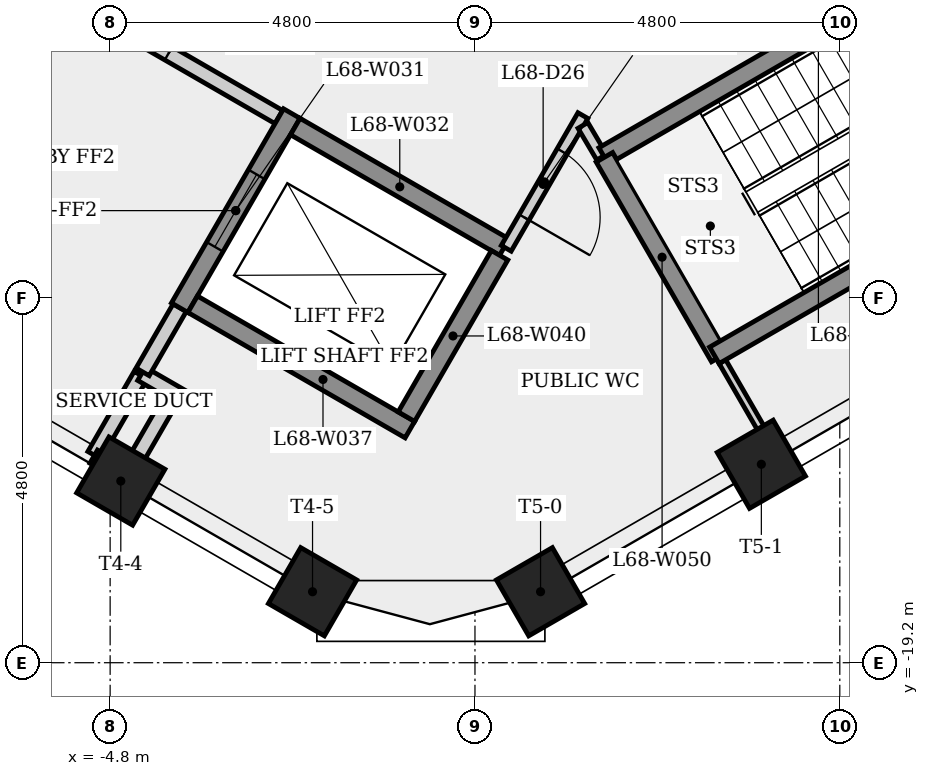
"""IFC4 building model, lengths in metres.
Left out: names, types, materials, properties, quantities, classifications, styles, units other than length and angle.
Written with IfcOpenShell. Run it as: python <this file> out.ifc"""

import sys

from ifc_helpers import new_model, si_unit, direction, frame, frame_2d, origin, origin_2d, place, context, subcontext, project, spatial, rectangle, extrude, element, fill, save


model = new_model("IFC4")
c1 = context("Model", 3, precision=1e-05, world=origin(), true_north=direction((0.0, 1.0)))
c2 = subcontext(c1, "Body", "Model", "MODEL_VIEW")
j1 = project(units=[si_unit("LENGTHUNIT", "METRE"), si_unit("PLANEANGLEUNIT", "RADIAN")], contexts=[c1])
p1 = place(None, origin())
s1 = spatial("IfcSite", under=j1, at=p1, CompositionType="ELEMENT")
p2 = place(p1, origin())
s2 = spatial("IfcBuilding", under=s1, at=p2, CompositionType="ELEMENT")
p3 = place(p2, frame((0.0, 0.0, 252.9)))
s3 = spatial("IfcBuildingStorey", under=s2, at=p3, CompositionType="ELEMENT", Elevation=252.9)
for number, where, z_axis, x_axis in (
    (1, (-4.66, -16.81, 0.0), (0.0, 0.0, 1.0), (-0.5, -0.866, 0.0)),
    (2, (-2.137, -18.266, 0.0), (0.0, 0.0, 1.0), (-0.5, -0.866, 0.0)),
    (3, (0.863, -18.266, 0.0), (0.0, 0.0, 1.0), (0.5, -0.866, 0.0)),
    (4, (3.768, -16.589, 0.0), (0.0, 0.0, 1.0), (0.5, -0.866, 0.0)),
):
    element("IfcColumn", number, at=place(p3, frame(where, z_axis=z_axis, x_axis=x_axis)), inside=s3, PredefinedType="COLUMN", context=c2, shape_type="SweptSolid", body=[
        extrude(rectangle(XDim=0.85, YDim=0.85, at=origin_2d()), origin(), (0.0, 0.0, 1.0), 5.0),
    ])
p4 = place(p3, frame((-6.435, -9.795, 0.0), z_axis=(0.0, 0.0, 1.0), x_axis=(0.866012907634, -0.500021643343, 0.0)))
e5 = element("IfcWall", 5, at=p4, inside=s3, PredefinedType="PARTITIONING", context=c2, shape_type="SweptSolid", body=[
    extrude(rectangle(XDim=4.45, YDim=0.2, at=frame_2d((2.225, 0.0))), origin(), (0.0, 0.0, 1.0), 4.6),
])
p5 = place(p4, frame((1.675, 0.0, 0.0)))
e6 = element("IfcOpeningElement", 6, at=p5, cuts=e5, PredefinedType="OPENING", context=c2, shape_type="SweptSolid", body=[
    extrude(rectangle(XDim=1.1, YDim=2.1, at=frame_2d((0.55, 1.05))), frame((0.0, 0.11, 0.0), z_axis=(0.0, -1.0, 0.0), x_axis=(1.0, 0.0, 0.0)), (0.0, 0.0, 1.0), 0.22),
])
p6 = place(p3, frame((-5.006, -16.471, 0.0), z_axis=(0.0, 0.0, 1.0), x_axis=(0.499913398087, 0.866075397649, 0.0)))
e7 = element("IfcWall", 7, at=p6, inside=s3, PredefinedType="PLUMBINGWALL", context=c2, shape_type="SweptSolid", body=[
    extrude(rectangle(XDim=1.218, YDim=0.2, at=frame_2d((0.609, 0.0))), origin(), (0.0, 0.0, 1.0), 4.6),
])
for number, where, z_axis, x_axis in (
    (8, (-4.497, -16.788, 0.0), (0.0, 0.0, 1.0), (-0.866, 0.5, 0.0)),
    (9, (-4.387, -15.399, 0.0), (0.0, 0.0, 1.0), (0.866, -0.5, 0.0)),
):
    element("IfcWall", number, at=place(p3, frame(where, z_axis=z_axis, x_axis=x_axis)), inside=s3, PredefinedType="PLUMBINGWALL", context=c2, shape_type="SweptSolid", body=[
        extrude(rectangle(XDim=0.6, YDim=0.2, at=frame_2d((0.3, 0.0))), origin(), (0.0, 0.0, 1.0), 4.6),
    ])
p7 = place(p3, frame((-4.004, -15.736, 0.0), z_axis=(0.0, 0.0, 1.0), x_axis=(-0.500062184469, -0.865989498588, 0.0)))
e10 = element("IfcWall", 10, at=p7, inside=s3, PredefinedType="PLUMBINGWALL", context=c2, shape_type="SweptSolid", body=[
    extrude(rectangle(XDim=1.057, YDim=0.2, at=frame_2d((0.529, 0.0))), origin(), (0.0, 0.0, 1.0), 4.6),
])
p8 = place(p3, frame((-3.885, -14.529, 0.0), z_axis=(0.0, 0.0, 1.0), x_axis=(-0.49998975084, -0.866031321059, 0.0)))
e11 = element("IfcWall", 11, at=p8, inside=s3, PredefinedType="PARTITIONING", context=c2, shape_type="SweptSolid", body=[
    extrude(rectangle(XDim=0.975, YDim=0.2, at=frame_2d((0.488, 0.0))), origin(), (0.0, 0.0, 1.0), 4.6),
])
p9 = place(p3, frame((-2.41, -11.974, 0.0), z_axis=(0.0, 0.0, 1.0), x_axis=(-0.500001826776, -0.866024349092, 0.0)))
e12 = element("IfcWall", 12, at=p9, inside=s3, PredefinedType="SHEAR", context=c2, shape_type="SweptSolid", body=[
    extrude(rectangle(XDim=2.95, YDim=0.25, at=frame_2d((1.475, 0.0))), origin(), (0.0, 0.0, 1.0), 4.6),
])
p10 = place(p9, frame((0.925, 0.0, 0.0)))
e13 = element("IfcOpeningElement", 13, at=p10, cuts=e12, PredefinedType="OPENING", context=c2, shape_type="SweptSolid", body=[
    extrude(rectangle(XDim=1.1, YDim=2.1, at=frame_2d((0.55, 1.05))), frame((0.0, 0.135, 0.0), z_axis=(0.0, -1.0, 0.0), x_axis=(1.0, 0.0, 0.0)), (0.0, 0.0, 1.0), 0.27),
])
p11 = place(p3, frame((-2.364, -12.145, 0.0), z_axis=(0.0, 0.0, 1.0), x_axis=(0.866048579423, -0.499959856469, 0.0)))
e14 = element("IfcWall", 14, at=p11, inside=s3, PredefinedType="SHEAR", context=c2, shape_type="SweptSolid", body=[
    extrude(rectangle(XDim=3.175, YDim=0.25, at=frame_2d((1.587, 0.0))), origin(), (0.0, 0.0, 1.0), 5.0),
])
p12 = place(p3, frame((-0.856, -16.133, 0.0), z_axis=(0.0, 0.0, 1.0), x_axis=(-0.866021716278, 0.500006386895, 0.0)))
e15 = element("IfcWall", 15, at=p12, inside=s3, PredefinedType="SHEAR", context=c2, shape_type="SweptSolid", body=[
    extrude(rectangle(XDim=3.3, YDim=0.25, at=frame_2d((1.65, 0.0))), origin(), (0.0, 0.0, 1.0), 4.6),
])
p13 = place(p3, frame((0.324, -13.839, 0.0), z_axis=(0.0, 0.0, 1.0), x_axis=(-0.500015484165, -0.866016463813, 0.0)))
e16 = element("IfcWall", 16, at=p13, inside=s3, PredefinedType="SHEAR", context=c2, shape_type="SweptSolid", body=[
    extrude(rectangle(XDim=2.452, YDim=0.25, at=frame_2d((1.226, 0.0))), origin(), (0.0, 0.0, 1.0), 5.0),
])
p14 = place(p3, frame((1.42, -12.0, 0.0), z_axis=(0.0, 0.0, 1.0), x_axis=(-0.499952933402, -0.866052575992, 0.0)))
e17 = element("IfcWall", 17, at=p14, inside=s3, PredefinedType="PARTITIONING", context=c2, shape_type="SweptSolid", body=[
    extrude(rectangle(XDim=2.017, YDim=0.15, at=frame_2d((1.009, 0.0))), origin(), (0.0, 0.0, 1.0), 4.6),
])
p15 = place(p14, frame((0.546, 0.0, 0.0)))
e18 = element("IfcOpeningElement", 18, at=p15, cuts=e17, PredefinedType="OPENING", context=c2, shape_type="SweptSolid", body=[
    extrude(rectangle(XDim=1.0, YDim=2.1, at=frame_2d((0.5, 1.05))), frame((0.0, 0.085, 0.0), z_axis=(0.0, -1.0, 0.0), x_axis=(1.0, 0.0, 0.0)), (0.0, 0.0, 1.0), 0.17),
])
p16 = place(p3, frame((1.667, -12.548, 0.0), z_axis=(0.0, 0.0, 1.0), x_axis=(-0.508186221736, 0.861247214241, 0.0)))
e19 = element("IfcWall", 19, at=p16, inside=s3, PredefinedType="PARTITIONING", context=c2, shape_type="SweptSolid", body=[
    extrude(rectangle(XDim=0.485, YDim=0.15, at=frame_2d((0.242, 0.0))), origin(), (0.0, 0.0, 1.0), 4.6),
])
p17 = place(p3, frame((1.693, -12.532, 0.0), z_axis=(0.0, 0.0, 1.0), x_axis=(0.866031063448, 0.499990197047, 0.0)))
e20 = element("IfcWall", 20, at=p17, inside=s3, PredefinedType="SHEAR", context=c2, shape_type="SweptSolid", body=[
    extrude(rectangle(XDim=6.525, YDim=0.25, at=frame_2d((3.263, 0.0))), origin(), (0.0, 0.0, 1.0), 4.6),
])
p18 = place(p17, frame((5.15, 0.0, 0.0)))
e21 = element("IfcOpeningElement", 21, at=p18, cuts=e20, PredefinedType="OPENING", context=c2, shape_type="SweptSolid", body=[
    extrude(rectangle(XDim=1.0, YDim=2.1, at=frame_2d((0.5, 1.05))), frame((0.0, 0.135, 0.0), z_axis=(0.0, -1.0, 0.0), x_axis=(1.0, 0.0, 0.0)), (0.0, 0.0, 1.0), 0.27),
])
p19 = place(p3, frame((3.221, -15.178, 0.0), z_axis=(0.0, 0.0, 1.0), x_axis=(-0.500014901547, 0.866016800201, 0.0)))
e22 = element("IfcWall", 22, at=p19, inside=s3, PredefinedType="SHEAR", context=c2, shape_type="SweptSolid", body=[
    extrude(rectangle(XDim=3.035, YDim=0.25, at=frame_2d((1.518, 0.0))), origin(), (0.0, 0.0, 1.0), 4.6),
])
p20 = place(p3, frame((3.99, -16.511, 0.0), z_axis=(0.0, 0.0, 1.0), x_axis=(-0.499928667132, 0.866066583918, 0.0)))
e23 = element("IfcWall", 23, at=p20, inside=s3, PredefinedType="PARTITIONING", context=c2, shape_type="SweptSolid", body=[
    extrude(rectangle(XDim=1.469, YDim=0.1, at=frame_2d((0.734, 0.0))), origin(), (0.0, 0.0, 1.0), 4.6),
])
p21 = place(p3, frame((8.627, -11.993, 0.0), z_axis=(0.0, 0.0, 1.0), x_axis=(-0.866032601554, -0.49998753289, 0.0)))
e24 = element("IfcWall", 24, at=p21, inside=s3, PredefinedType="SHEAR", context=c2, shape_type="SweptSolid", body=[
    extrude(rectangle(XDim=6.325, YDim=0.25, at=frame_2d((3.163, 0.0))), origin(), (0.0, 0.0, 1.0), 4.6),
])
p22 = place(p5, origin())
e25 = element("IfcDoor", 25, at=p22, inside=s3, OperationType="SINGLE_SWING_RIGHT", PredefinedType="DOOR", context=c2, shape_type="SweptSolid", body=[
    extrude(rectangle(XDim=1.1, YDim=2.1, at=frame_2d((0.55, 1.05))), frame((0.0, 0.025, 0.0), z_axis=(0.0, -1.0, 0.0), x_axis=(1.0, 0.0, 0.0)), (0.0, 0.0, 1.0), 0.05),
])
fill(e6, e25)
p23 = place(p10, origin())
e26 = element("IfcDoor", 26, at=p23, inside=s3, OperationType="SLIDING_TO_LEFT", PredefinedType="DOOR", context=c2, shape_type="SweptSolid", body=[
    extrude(rectangle(XDim=1.1, YDim=2.1, at=frame_2d((0.55, 1.05))), frame((0.0, 0.025, 0.0), z_axis=(0.0, -1.0, 0.0), x_axis=(1.0, 0.0, 0.0)), (0.0, 0.0, 1.0), 0.05),
])
fill(e13, e26)
p24 = place(p15, origin())
e27 = element("IfcDoor", 27, at=p24, inside=s3, OperationType="SINGLE_SWING_RIGHT", PredefinedType="DOOR", context=c2, shape_type="SweptSolid", body=[
    extrude(rectangle(XDim=1.0, YDim=2.1, at=frame_2d((0.5, 1.05))), frame((0.0, 0.025, 0.0), z_axis=(0.0, -1.0, 0.0), x_axis=(1.0, 0.0, 0.0)), (0.0, 0.0, 1.0), 0.05),
])
fill(e18, e27)
save(model, sys.argv[1])
